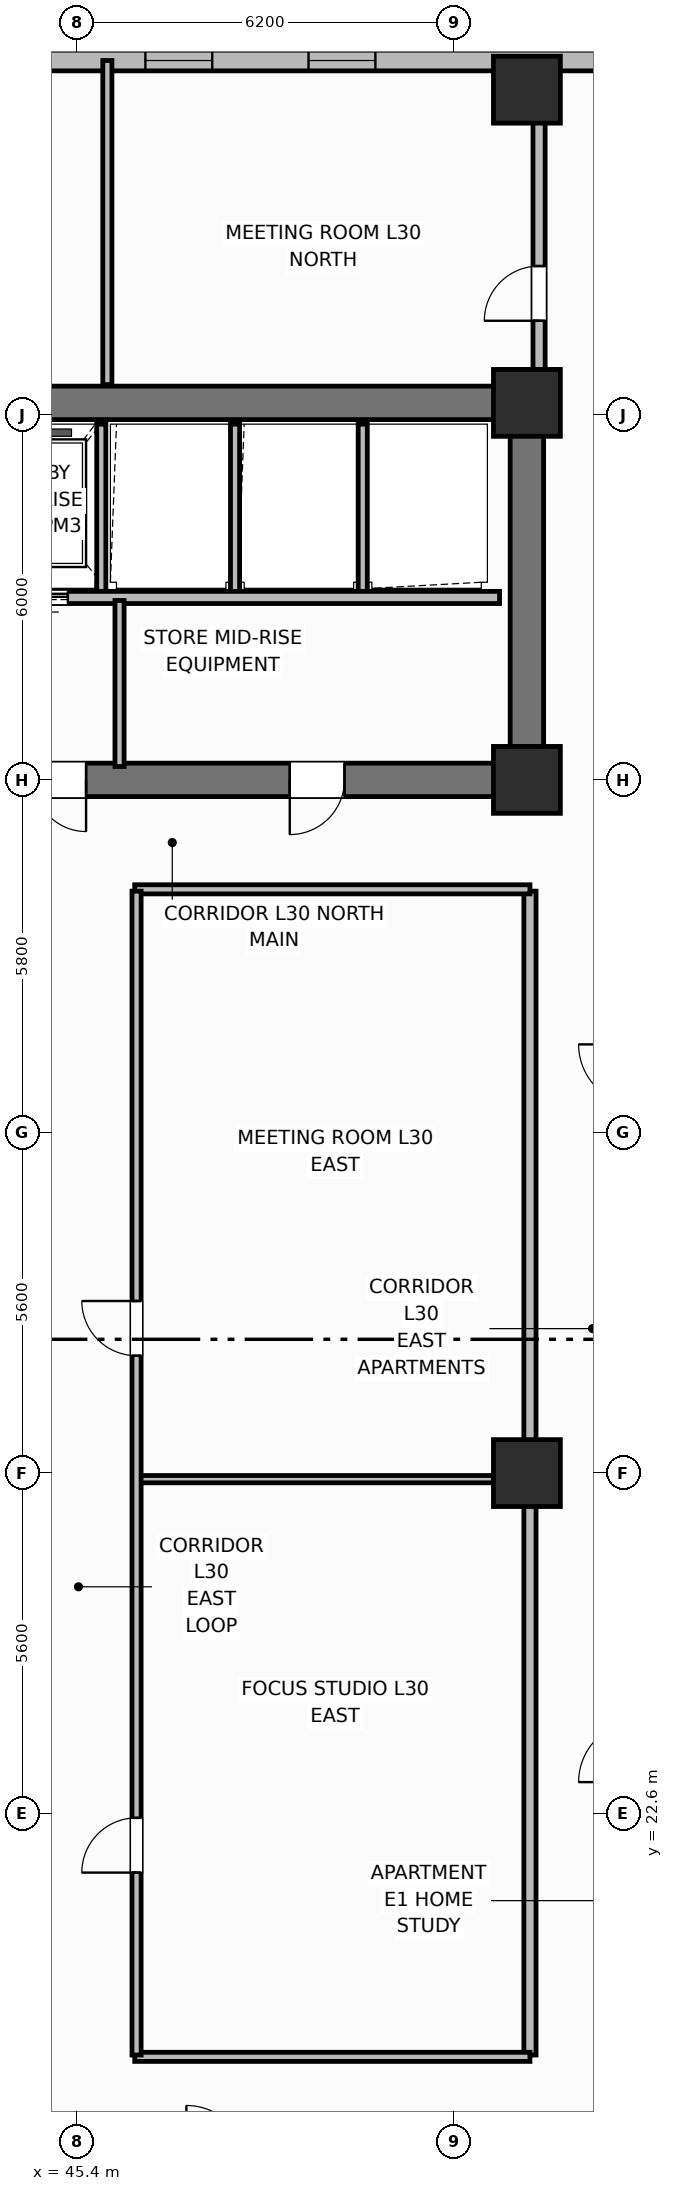
"""IFC4 building model, lengths in metres.
Left out: names, types, materials, properties, quantities, classifications, styles, units other than length and angle.
Written with IfcOpenShell. Run it as: python <this file> out.ifc"""

import sys

from ifc_helpers import new_model, si_unit, direction, frame, frame_2d, origin, origin_2d, place, context, subcontext, project, spatial, rectangle, extrude, element, fill, save


model = new_model("IFC4")
c1 = context("Model", 3, precision=1e-05, world=origin(), true_north=direction((0.0, 1.0)))
c2 = subcontext(c1, "Body", "Model", "MODEL_VIEW")
j1 = project(units=[si_unit("LENGTHUNIT", "METRE"), si_unit("PLANEANGLEUNIT", "RADIAN")], contexts=[c1])
p1 = place(None, origin())
s1 = spatial("IfcSite", under=j1, at=p1, CompositionType="ELEMENT")
p2 = place(p1, origin())
s2 = spatial("IfcBuilding", under=s1, at=p2, CompositionType="ELEMENT")
p3 = place(p2, frame((0.0, 0.0, 121.6)))
s3 = spatial("IfcBuildingStorey", under=s2, at=p3, CompositionType="ELEMENT", Elevation=121.6)
p4 = place(p3, frame((25.6, 45.8, 0.0), z_axis=(0.0, 0.0, 1.0), x_axis=(1.0, 0.0, 0.0)))
e1 = element("IfcWall", 1, at=p4, inside=s3, PredefinedType="SHEAR", context=c2, shape_type="SweptSolid", body=[
    extrude(rectangle(XDim=27.2, YDim=0.55, at=frame_2d((13.6, 0.0))), origin(), (0.0, 0.0, 1.0), 3.7),
])
p5 = place(p3, frame((52.8, 39.875, 0.0), z_axis=(0.0, 0.0, 1.0), x_axis=(0.0, 1.0, 0.0)))
e2 = element("IfcWall", 2, at=p5, inside=s3, PredefinedType="SHEAR", context=c2, shape_type="SweptSolid", body=[
    extrude(rectangle(XDim=5.65, YDim=0.55, at=frame_2d((2.825, 0.0))), origin(), (0.0, 0.0, 1.0), 3.7),
])
p6 = place(p3, frame((52.8, 39.6, 0.0), z_axis=(0.0, 0.0, 1.0), x_axis=(-1.0, 0.0, 0.0)))
e3 = element("IfcWall", 3, at=p6, inside=s3, PredefinedType="SHEAR", context=c2, shape_type="SweptSolid", body=[
    extrude(rectangle(XDim=27.2, YDim=0.55, at=frame_2d((13.6, 0.0))), origin(), (0.0, 0.0, 1.0), 3.7),
])
p7 = place(p6, frame((24.2, 0.0, 0.0)))
e4 = element("IfcOpeningElement", 4, at=p7, cuts=e3, PredefinedType="OPENING", context=c2, shape_type="SweptSolid", body=[
    extrude(rectangle(XDim=1.1, YDim=2.15, at=frame_2d((0.55, 1.075))), frame((0.0, 0.285, 0.0), z_axis=(0.0, -1.0, 0.0), x_axis=(1.0, 0.0, 0.0)), (0.0, 0.0, 1.0), 0.57),
])
p8 = place(p6, frame((15.1, 0.0, 0.0)))
e5 = element("IfcOpeningElement", 5, at=p8, cuts=e3, PredefinedType="OPENING", context=c2, shape_type="SweptSolid", body=[
    extrude(rectangle(XDim=1.2, YDim=2.15, at=frame_2d((0.6, 1.075))), frame((0.0, 0.285, 0.0), z_axis=(0.0, -1.0, 0.0), x_axis=(1.0, 0.0, 0.0)), (0.0, 0.0, 1.0), 0.57),
])
p9 = place(p6, frame((11.3, 0.0, 0.0)))
e6 = element("IfcOpeningElement", 6, at=p9, cuts=e3, PredefinedType="OPENING", context=c2, shape_type="SweptSolid", body=[
    extrude(rectangle(XDim=1.3, YDim=2.2, at=frame_2d((0.65, 1.1))), frame((0.0, 0.285, 0.0), z_axis=(0.0, -1.0, 0.0), x_axis=(1.0, 0.0, 0.0)), (0.0, 0.0, 1.0), 0.57),
])
p10 = place(p6, frame((7.25, 0.0, 0.0)))
e7 = element("IfcOpeningElement", 7, at=p10, cuts=e3, PredefinedType="OPENING", context=c2, shape_type="SweptSolid", body=[
    extrude(rectangle(XDim=0.85, YDim=2.1, at=frame_2d((0.425, 1.05))), frame((0.0, 0.285, 0.0), z_axis=(0.0, -1.0, 0.0), x_axis=(1.0, 0.0, 0.0)), (0.0, 0.0, 1.0), 0.57),
])
p11 = place(p6, frame((3.0, 0.0, 0.0)))
e8 = element("IfcOpeningElement", 8, at=p11, cuts=e3, PredefinedType="OPENING", context=c2, shape_type="SweptSolid", body=[
    extrude(rectangle(XDim=0.9, YDim=2.1, at=frame_2d((0.45, 1.05))), frame((0.0, 0.285, 0.0), z_axis=(0.0, -1.0, 0.0), x_axis=(1.0, 0.0, 0.0)), (0.0, 0.0, 1.0), 0.57),
])
for number, where, z_axis, x_axis in (
    (9, (52.8, 39.6, 0.0), (0.0, 0.0, 1.0), (1.0, 0.0, 0.0)),
    (10, (52.8, 45.8, 0.0), (0.0, 0.0, 1.0), (1.0, 0.0, 0.0)),
    (11, (52.8, 28.2, 0.0), (0.0, 0.0, 1.0), (1.0, 0.0, 0.0)),
    (12, (52.8, 50.95, 0.0), (0.0, 0.0, 1.0), (1.0, 0.0, 0.0)),
):
    element("IfcColumn", number, at=place(p3, frame(where, z_axis=z_axis, x_axis=x_axis)), inside=s3, PredefinedType="COLUMN", context=c2, shape_type="SweptSolid", body=[
        extrude(rectangle(XDim=1.1, YDim=1.1, at=origin_2d()), origin(), (0.0, 0.0, 1.0), 3.7),
    ])
p12 = place(p3, frame((59.8, 51.43, 0.0), z_axis=(0.0, 0.0, 1.0), x_axis=(-1.0, 0.0, 0.0)))
e13 = element("IfcWall", 13, at=p12, inside=s3, PredefinedType="SOLIDWALL", context=c2, shape_type="SweptSolid", body=[
    extrude(rectangle(XDim=17.4, YDim=0.34, at=frame_2d((8.7, 0.0))), origin(), (0.0, 0.0, 1.0), 2.7),
])
p13 = place(p12, frame((1.442, 0.0, 0.93)))
e14 = element("IfcOpeningElement", 14, at=p13, cuts=e13, PredefinedType="OPENING", context=c2, shape_type="SweptSolid", body=[
    extrude(rectangle(XDim=1.1, YDim=1.65, at=frame_2d((0.55, 0.825))), frame((0.0, 0.18, 0.0), z_axis=(0.0, -1.0, 0.0), x_axis=(1.0, 0.0, 0.0)), (0.0, 0.0, 1.0), 0.36),
])
p14 = place(p12, frame((3.425, 0.0, 0.93)))
e15 = element("IfcOpeningElement", 15, at=p14, cuts=e13, PredefinedType="OPENING", context=c2, shape_type="SweptSolid", body=[
    extrude(rectangle(XDim=1.1, YDim=1.65, at=frame_2d((0.55, 0.825))), frame((0.0, 0.18, 0.0), z_axis=(0.0, -1.0, 0.0), x_axis=(1.0, 0.0, 0.0)), (0.0, 0.0, 1.0), 0.36),
])
p15 = place(p12, frame((9.492, 0.0, 0.93)))
e16 = element("IfcOpeningElement", 16, at=p15, cuts=e13, PredefinedType="OPENING", context=c2, shape_type="SweptSolid", body=[
    extrude(rectangle(XDim=1.1, YDim=1.65, at=frame_2d((0.55, 0.825))), frame((0.0, 0.18, 0.0), z_axis=(0.0, -1.0, 0.0), x_axis=(1.0, 0.0, 0.0)), (0.0, 0.0, 1.0), 0.36),
])
p16 = place(p12, frame((12.175, 0.0, 0.93)))
e17 = element("IfcOpeningElement", 17, at=p16, cuts=e13, PredefinedType="OPENING", context=c2, shape_type="SweptSolid", body=[
    extrude(rectangle(XDim=1.1, YDim=1.65, at=frame_2d((0.55, 0.825))), frame((0.0, 0.18, 0.0), z_axis=(0.0, -1.0, 0.0), x_axis=(1.0, 0.0, 0.0)), (0.0, 0.0, 1.0), 0.36),
])
for number, where, z_axis, x_axis in (
    (18, (45.8, 42.65, 0.0), (0.0, 0.0, 1.0), (0.0, 1.0, 0.0)),
    (19, (48.0, 42.65, 0.0), (0.0, 0.0, 1.0), (0.0, 1.0, 0.0)),
    (20, (50.1, 42.65, 0.0), (0.0, 0.0, 1.0), (0.0, 1.0, 0.0)),
):
    element("IfcWall", number, at=place(p3, frame(where, z_axis=z_axis, x_axis=x_axis)), inside=s3, PredefinedType="PARTITIONING", context=c2, shape_type="SweptSolid", body=[
        extrude(rectangle(XDim=2.8, YDim=0.15, at=frame_2d((1.4, 0.0))), origin(), (0.0, 0.0, 1.0), 2.53),
    ])
p17 = place(p3, frame((52.35, 42.6, 0.0), z_axis=(0.0, 0.0, 1.0), x_axis=(-1.0, 0.0, 0.0)))
e21 = element("IfcWall", 21, at=p17, inside=s3, PredefinedType="PARTITIONING", context=c2, shape_type="SweptSolid", body=[
    extrude(rectangle(XDim=8.8, YDim=0.2, at=frame_2d((4.4, 0.0))), origin(), (0.0, 0.0, 1.0), 2.53),
])
p18 = place(p17, frame((7.1, 0.0, 0.0)))
e22 = element("IfcOpeningElement", 22, at=p18, cuts=e21, PredefinedType="OPENING", context=c2, shape_type="SweptSolid", body=[
    extrude(rectangle(XDim=1.0, YDim=2.15, at=frame_2d((0.5, 1.075))), frame((0.0, 0.11, 0.0), z_axis=(0.0, -1.0, 0.0), x_axis=(1.0, 0.0, 0.0)), (0.0, 0.0, 1.0), 0.22),
])
p19 = place(p3, frame((46.1, 39.82, 0.0), z_axis=(0.0, 0.0, 1.0), x_axis=(0.0, 1.0, 0.0)))
e23 = element("IfcWall", 23, at=p19, inside=s3, PredefinedType="PARTITIONING", context=c2, shape_type="SweptSolid", body=[
    extrude(rectangle(XDim=2.73, YDim=0.15, at=frame_2d((1.365, 0.0))), origin(), (0.0, 0.0, 1.0), 2.53),
])
p20 = place(p3, frame((52.85, 18.63, 0.0), z_axis=(0.0, 0.0, 1.0), x_axis=(0.0, 1.0, 0.0)))
e24 = element("IfcWall", 24, at=p20, inside=s3, PredefinedType="PARTITIONING", context=c2, shape_type="SweptSolid", body=[
    extrude(rectangle(XDim=19.14, YDim=0.2, at=frame_2d((9.57, 0.0))), origin(), (0.0, 0.0, 1.0), 2.53),
])
for number, where, z_axis, x_axis in (
    (25, (46.35, 18.6, 0.0), (0.0, 0.0, 1.0), (1.0, 0.0, 0.0)),
    (26, (46.35, 37.8, 0.0), (0.0, 0.0, 1.0), (1.0, 0.0, 0.0)),
):
    element("IfcWall", number, at=place(p3, frame(where, z_axis=z_axis, x_axis=x_axis)), inside=s3, PredefinedType="PARTITIONING", context=c2, shape_type="SweptSolid", body=[
        extrude(rectangle(XDim=6.5, YDim=0.15, at=frame_2d((3.25, 0.0))), origin(), (0.0, 0.0, 1.0), 2.53),
    ])
p21 = place(p3, frame((46.38, 28.1, 0.0), z_axis=(0.0, 0.0, 1.0), x_axis=(1.0, 0.0, 0.0)))
e27 = element("IfcWall", 27, at=p21, inside=s3, PredefinedType="PARTITIONING", context=c2, shape_type="SweptSolid", body=[
    extrude(rectangle(XDim=6.42, YDim=0.12, at=frame_2d((3.21, 0.0))), origin(), (0.0, 0.0, 1.0), 2.53),
])
p22 = place(p3, frame((46.38, 18.63, 0.0), z_axis=(0.0, 0.0, 1.0), x_axis=(0.0, 1.0, 0.0)))
e28 = element("IfcWall", 28, at=p22, inside=s3, PredefinedType="PARTITIONING", context=c2, shape_type="SweptSolid", body=[
    extrude(rectangle(XDim=19.14, YDim=0.15, at=frame_2d((9.57, 0.0))), origin(), (0.0, 0.0, 1.0), 2.53),
])
p23 = place(p22, frame((3.0, 0.0, 0.0)))
e29 = element("IfcOpeningElement", 29, at=p23, cuts=e28, PredefinedType="OPENING", context=c2, shape_type="SweptSolid", body=[
    extrude(rectangle(XDim=0.9, YDim=2.1, at=frame_2d((0.45, 1.05))), frame((0.0, 0.085, 0.0), z_axis=(0.0, -1.0, 0.0), x_axis=(1.0, 0.0, 0.0)), (0.0, 0.0, 1.0), 0.17),
])
p24 = place(p22, frame((11.5, 0.0, 0.0)))
e30 = element("IfcOpeningElement", 30, at=p24, cuts=e28, PredefinedType="OPENING", context=c2, shape_type="SweptSolid", body=[
    extrude(rectangle(XDim=0.9, YDim=2.1, at=frame_2d((0.45, 1.05))), frame((0.0, 0.085, 0.0), z_axis=(0.0, -1.0, 0.0), x_axis=(1.0, 0.0, 0.0)), (0.0, 0.0, 1.0), 0.17),
])
p25 = place(p3, frame((45.9, 46.1, 0.0), z_axis=(0.0, 0.0, 1.0), x_axis=(0.0, 1.0, 0.0)))
e31 = element("IfcWall", 31, at=p25, inside=s3, PredefinedType="PARTITIONING", context=c2, shape_type="SweptSolid", body=[
    extrude(rectangle(XDim=5.33, YDim=0.15, at=frame_2d((2.665, 0.0))), origin(), (0.0, 0.0, 1.0), 2.53),
])
p26 = place(p3, frame((53.0, 46.1, 0.0), z_axis=(0.0, 0.0, 1.0), x_axis=(0.0, 1.0, 0.0)))
e32 = element("IfcWall", 32, at=p26, inside=s3, PredefinedType="PARTITIONING", context=c2, shape_type="SweptSolid", body=[
    extrude(rectangle(XDim=4.53, YDim=0.2, at=frame_2d((2.265, 0.0))), origin(), (0.0, 0.0, 1.0), 2.53),
])
p27 = place(p26, frame((1.05, 0.0, 0.0)))
e33 = element("IfcOpeningElement", 33, at=p27, cuts=e32, PredefinedType="OPENING", context=c2, shape_type="SweptSolid", body=[
    extrude(rectangle(XDim=0.9, YDim=2.1, at=frame_2d((0.45, 1.05))), frame((0.0, 0.11, 0.0), z_axis=(0.0, -1.0, 0.0), x_axis=(1.0, 0.0, 0.0)), (0.0, 0.0, 1.0), 0.22),
])
p28 = place(p15, origin())
e34 = element("IfcWindow", 34, at=p28, inside=s3, PartitioningType="SINGLE_PANEL", PredefinedType="WINDOW", context=c2, shape_type="SweptSolid", body=[
    extrude(rectangle(XDim=1.1, YDim=1.65, at=frame_2d((0.55, 0.825))), frame((0.0, 0.03, 0.0), z_axis=(0.0, -1.0, 0.0), x_axis=(1.0, 0.0, 0.0)), (0.0, 0.0, 1.0), 0.06),
])
fill(e16, e34)
p29 = place(p16, origin())
e35 = element("IfcWindow", 35, at=p29, inside=s3, PartitioningType="SINGLE_PANEL", PredefinedType="WINDOW", context=c2, shape_type="SweptSolid", body=[
    extrude(rectangle(XDim=1.1, YDim=1.65, at=frame_2d((0.55, 0.825))), frame((0.0, 0.03, 0.0), z_axis=(0.0, -1.0, 0.0), x_axis=(1.0, 0.0, 0.0)), (0.0, 0.0, 1.0), 0.06),
])
fill(e17, e35)
p30 = place(p18, origin())
e36 = element("IfcDoor", 36, at=p30, inside=s3, OperationType="SLIDING_TO_LEFT", PredefinedType="DOOR", context=c2, shape_type="SweptSolid", body=[
    extrude(rectangle(XDim=1.0, YDim=2.15, at=frame_2d((0.5, 1.075))), frame((0.0, 0.025, 0.0), z_axis=(0.0, -1.0, 0.0), x_axis=(1.0, 0.0, 0.0)), (0.0, 0.0, 1.0), 0.05),
])
fill(e22, e36)
p31 = place(p23, origin())
e37 = element("IfcDoor", 37, at=p31, inside=s3, OperationType="SINGLE_SWING_LEFT", PredefinedType="DOOR", context=c2, shape_type="SweptSolid", body=[
    extrude(rectangle(XDim=0.9, YDim=2.1, at=frame_2d((0.45, 1.05))), frame((0.0, 0.025, 0.0), z_axis=(0.0, -1.0, 0.0), x_axis=(1.0, 0.0, 0.0)), (0.0, 0.0, 1.0), 0.05),
])
fill(e29, e37)
p32 = place(p24, origin())
e38 = element("IfcDoor", 38, at=p32, inside=s3, OperationType="SINGLE_SWING_RIGHT", PredefinedType="DOOR", context=c2, shape_type="SweptSolid", body=[
    extrude(rectangle(XDim=0.9, YDim=2.1, at=frame_2d((0.45, 1.05))), frame((0.0, 0.025, 0.0), z_axis=(0.0, -1.0, 0.0), x_axis=(1.0, 0.0, 0.0)), (0.0, 0.0, 1.0), 0.05),
])
fill(e30, e38)
p33 = place(p27, origin())
e39 = element("IfcDoor", 39, at=p33, inside=s3, OperationType="SINGLE_SWING_LEFT", PredefinedType="DOOR", context=c2, shape_type="SweptSolid", body=[
    extrude(rectangle(XDim=0.9, YDim=2.1, at=frame_2d((0.45, 1.05))), frame((0.0, 0.025, 0.0), z_axis=(0.0, -1.0, 0.0), x_axis=(1.0, 0.0, 0.0)), (0.0, 0.0, 1.0), 0.05),
])
fill(e33, e39)
p34 = place(p10, origin())
e40 = element("IfcDoor", 40, at=p34, inside=s3, OperationType="SINGLE_SWING_LEFT", PredefinedType="DOOR", context=c2, shape_type="SweptSolid", body=[
    extrude(rectangle(XDim=0.85, YDim=2.1, at=frame_2d((0.425, 1.05))), frame((0.0, 0.025, 0.0), z_axis=(0.0, -1.0, 0.0), x_axis=(1.0, 0.0, 0.0)), (0.0, 0.0, 1.0), 0.05),
])
fill(e7, e40)
p35 = place(p11, origin())
e41 = element("IfcDoor", 41, at=p35, inside=s3, OperationType="SINGLE_SWING_RIGHT", PredefinedType="DOOR", context=c2, shape_type="SweptSolid", body=[
    extrude(rectangle(XDim=0.9, YDim=2.1, at=frame_2d((0.45, 1.05))), frame((0.0, 0.025, 0.0), z_axis=(0.0, -1.0, 0.0), x_axis=(1.0, 0.0, 0.0)), (0.0, 0.0, 1.0), 0.05),
])
fill(e8, e41)
save(model, sys.argv[1])
